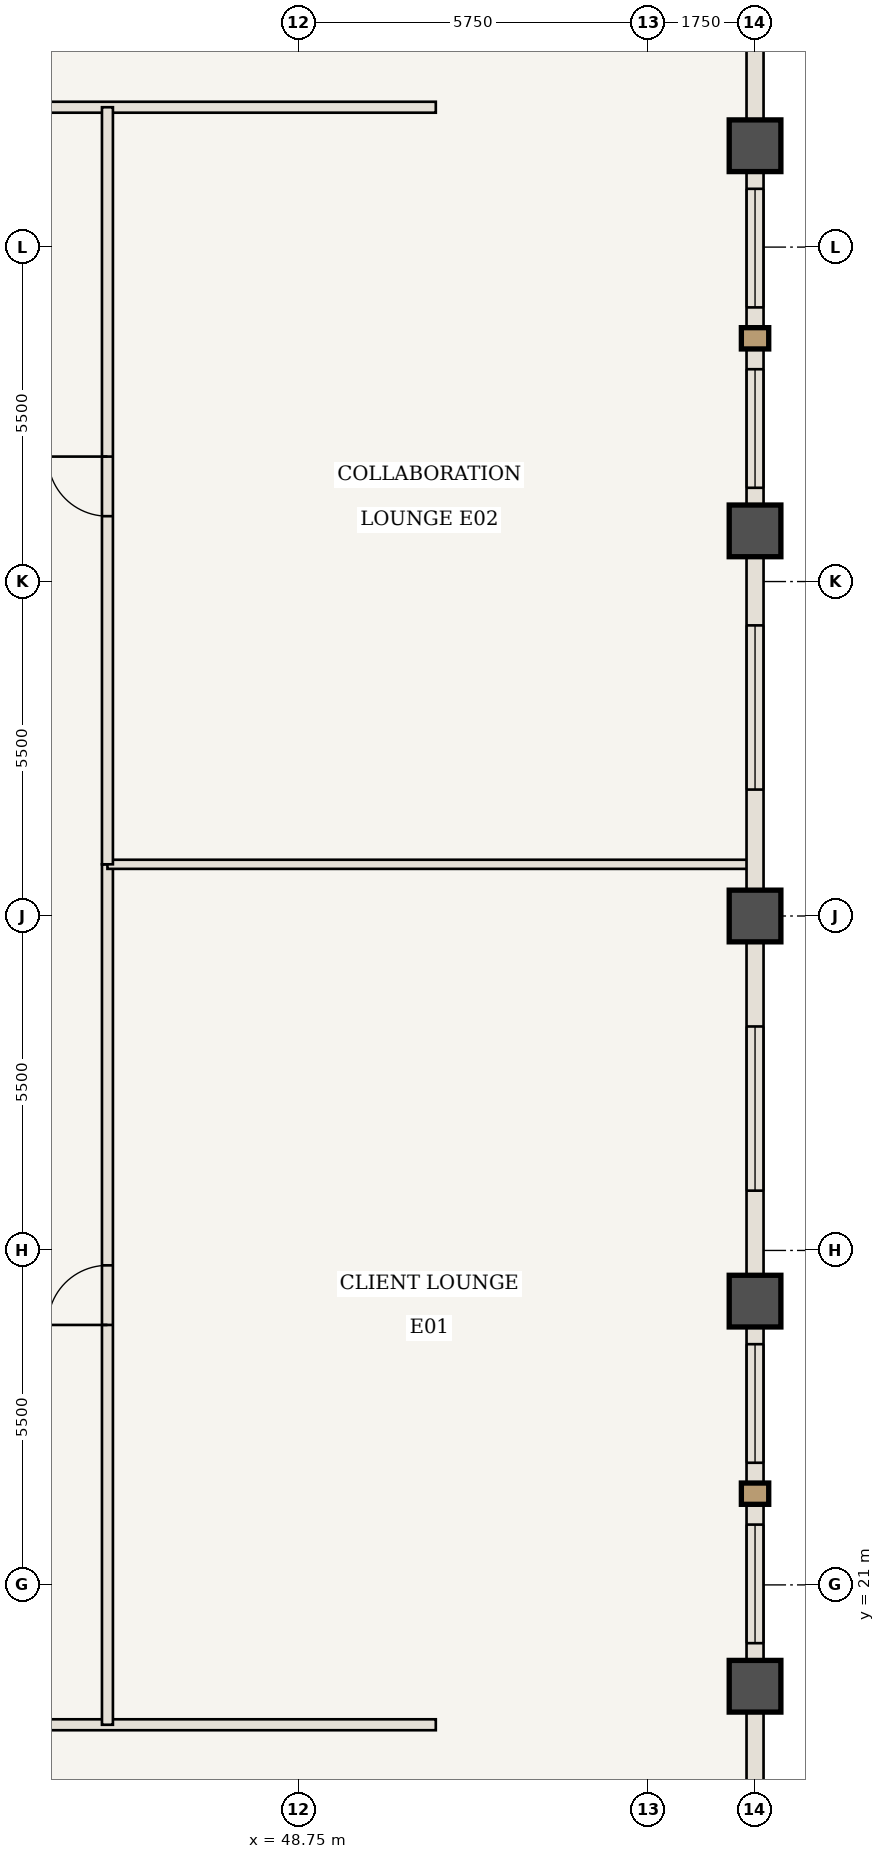
"""IFC4 building model, lengths in metres.
Left out: names, types, materials, properties, quantities, classifications, styles, units other than length and angle.
Written with IfcOpenShell. Run it as: python <this file> out.ifc"""

import sys

from ifc_helpers import new_model, si_unit, direction, frame, frame_2d, origin, origin_2d, place, context, subcontext, project, spatial, rectangle, extrude, element, fill, save


model = new_model("IFC4")
c1 = context("Model", 3, precision=1e-05, world=origin(), true_north=direction((0.0, 1.0)))
c2 = subcontext(c1, "Body", "Model", "MODEL_VIEW")
j1 = project(units=[si_unit("LENGTHUNIT", "METRE"), si_unit("PLANEANGLEUNIT", "RADIAN")], contexts=[c1])
p1 = place(None, origin())
s1 = spatial("IfcSite", under=j1, at=p1, CompositionType="ELEMENT")
p2 = place(p1, origin())
s2 = spatial("IfcBuilding", under=s1, at=p2, CompositionType="ELEMENT")
p3 = place(p2, frame((0.0, 0.0, 217.7)))
s3 = spatial("IfcBuildingStorey", under=s2, at=p3, CompositionType="ELEMENT", Elevation=217.7)
for number, where, z_axis, x_axis in (
    (1, (56.25, 19.333, 0.0), (0.0, 0.0, 1.0), (1.0, 0.0, 0.0)),
    (2, (56.25, 25.667, 0.0), (0.0, 0.0, 1.0), (1.0, 0.0, 0.0)),
    (3, (56.25, 32.0, 0.0), (0.0, 0.0, 1.0), (1.0, 0.0, 0.0)),
    (4, (56.25, 38.333, 0.0), (0.0, 0.0, 1.0), (1.0, 0.0, 0.0)),
    (5, (56.25, 44.667, 0.0), (0.0, 0.0, 1.0), (1.0, 0.0, 0.0)),
):
    element("IfcColumn", number, at=place(p3, frame(where, z_axis=z_axis, x_axis=x_axis)), inside=s3, PredefinedType="COLUMN", context=c2, shape_type="SweptSolid", body=[
        extrude(rectangle(XDim=0.85, YDim=0.85, at=origin_2d()), origin(), (0.0, 0.0, 1.0), 3.85),
    ])
p4 = place(p3, frame((32.925, 18.7, 0.0), z_axis=(0.0, 0.0, 1.0), x_axis=(1.0, 0.0, 0.0)))
e6 = element("IfcWall", 6, at=p4, inside=s3, PredefinedType="STANDARD", context=c2, shape_type="SweptSolid", body=[
    extrude(rectangle(XDim=18.075, YDim=0.18, at=frame_2d((9.038, 0.0))), origin(), (0.0, 0.0, 1.0), 3.685),
])
p5 = place(p4, frame((5.812, 0.0, 0.0)))
e7 = element("IfcOpeningElement", 7, at=p5, cuts=e6, PredefinedType="OPENING", context=c2, shape_type="SweptSolid", body=[
    extrude(rectangle(XDim=0.98, YDim=2.2, at=frame_2d((0.49, 1.1))), frame((0.0, 0.1, 0.0), z_axis=(0.0, -1.0, 0.0), x_axis=(1.0, 0.0, 0.0)), (0.0, 0.0, 1.0), 0.2),
])
p6 = place(p3, frame((24.542, 45.3, 0.0), z_axis=(0.0, 0.0, 1.0), x_axis=(1.0, 0.0, 0.0)))
e8 = element("IfcWall", 8, at=p6, inside=s3, PredefinedType="STANDARD", context=c2, shape_type="SweptSolid", body=[
    extrude(rectangle(XDim=26.458, YDim=0.18, at=frame_2d((13.229, 0.0))), origin(), (0.0, 0.0, 1.0), 3.685),
])
p7 = place(p6, frame((10.004, 0.0, 0.0)))
e9 = element("IfcOpeningElement", 9, at=p7, cuts=e8, PredefinedType="OPENING", context=c2, shape_type="SweptSolid", body=[
    extrude(rectangle(XDim=0.98, YDim=2.2, at=frame_2d((0.49, 1.1))), frame((0.0, 0.1, 0.0), z_axis=(0.0, -1.0, 0.0), x_axis=(1.0, 0.0, 0.0)), (0.0, 0.0, 1.0), 0.2),
])
p8 = place(p3, frame((45.6, 18.7, 0.0), z_axis=(0.0, 0.0, 1.0), x_axis=(0.0, 1.0, 0.0)))
e10 = element("IfcWall", 10, at=p8, inside=s3, PredefinedType="STANDARD", context=c2, shape_type="SweptSolid", body=[
    extrude(rectangle(XDim=14.15, YDim=0.18, at=frame_2d((7.075, 0.0))), origin(), (0.0, 0.0, 1.0), 3.685),
])
p9 = place(p8, frame((6.575, 0.0, 0.0)))
e11 = element("IfcOpeningElement", 11, at=p9, cuts=e10, PredefinedType="OPENING", context=c2, shape_type="SweptSolid", body=[
    extrude(rectangle(XDim=0.98, YDim=2.2, at=frame_2d((0.49, 1.1))), frame((0.0, 0.1, 0.0), z_axis=(0.0, -1.0, 0.0), x_axis=(1.0, 0.0, 0.0)), (0.0, 0.0, 1.0), 0.2),
])
p10 = place(p3, frame((45.6, 32.85, 0.0), z_axis=(0.0, 0.0, 1.0), x_axis=(1.0, 0.0, 0.0)))
e12 = element("IfcWall", 12, at=p10, inside=s3, PredefinedType="STANDARD", context=c2, shape_type="SweptSolid", body=[
    extrude(rectangle(XDim=10.59, YDim=0.15, at=frame_2d((5.295, 0.0))), origin(), (0.0, 0.0, 1.0), 3.685),
])
p11 = place(p3, frame((45.6, 32.85, 0.0), z_axis=(0.0, 0.0, 1.0), x_axis=(0.0, 1.0, 0.0)))
e13 = element("IfcWall", 13, at=p11, inside=s3, PredefinedType="STANDARD", context=c2, shape_type="SweptSolid", body=[
    extrude(rectangle(XDim=12.45, YDim=0.18, at=frame_2d((6.225, 0.0))), origin(), (0.0, 0.0, 1.0), 3.685),
])
p12 = place(p11, frame((5.725, 0.0, 0.0)))
e14 = element("IfcOpeningElement", 14, at=p12, cuts=e13, PredefinedType="OPENING", context=c2, shape_type="SweptSolid", body=[
    extrude(rectangle(XDim=0.98, YDim=2.2, at=frame_2d((0.49, 1.1))), frame((0.0, 0.1, 0.0), z_axis=(0.0, -1.0, 0.0), x_axis=(1.0, 0.0, 0.0)), (0.0, 0.0, 1.0), 0.2),
])
p13 = place(p3, frame((56.25, 19.333, 0.0), z_axis=(0.0, 0.0, 1.0), x_axis=(0.0, -1.0, 0.0)))
e15 = element("IfcWall", 15, at=p13, inside=s3, PredefinedType="USERDEFINED", context=c2, shape_type="SweptSolid", body=[
    extrude(rectangle(XDim=6.333, YDim=0.28, at=frame_2d((3.167, 0.0))), origin(), (0.0, 0.0, 1.0), 2.985),
])
p14 = place(p3, frame((56.25, 25.667, 0.0), z_axis=(0.0, 0.0, 1.0), x_axis=(0.0, -1.0, 0.0)))
e16 = element("IfcWall", 16, at=p14, inside=s3, PredefinedType="USERDEFINED", context=c2, shape_type="SweptSolid", body=[
    extrude(rectangle(XDim=6.333, YDim=0.28, at=frame_2d((3.167, 0.0))), origin(), (0.0, 0.0, 1.0), 2.985),
])
p15 = place(p14, frame((0.708, 0.0, 0.85)))
e17 = element("IfcOpeningElement", 17, at=p15, cuts=e16, PredefinedType="OPENING", context=c2, shape_type="SweptSolid", body=[
    extrude(rectangle(XDim=1.95, YDim=1.935, at=frame_2d((0.975, 0.968))), frame((0.0, 0.15, 0.0), z_axis=(0.0, -1.0, 0.0), x_axis=(1.0, 0.0, 0.0)), (0.0, 0.0, 1.0), 0.3),
])
p16 = place(p14, frame((3.675, 0.0, 0.85)))
e18 = element("IfcOpeningElement", 18, at=p16, cuts=e16, PredefinedType="OPENING", context=c2, shape_type="SweptSolid", body=[
    extrude(rectangle(XDim=1.95, YDim=1.935, at=frame_2d((0.975, 0.968))), frame((0.0, 0.15, 0.0), z_axis=(0.0, -1.0, 0.0), x_axis=(1.0, 0.0, 0.0)), (0.0, 0.0, 1.0), 0.3),
])
p17 = place(p3, frame((56.25, 32.0, 0.0), z_axis=(0.0, 0.0, 1.0), x_axis=(0.0, -1.0, 0.0)))
e19 = element("IfcWall", 19, at=p17, inside=s3, PredefinedType="USERDEFINED", context=c2, shape_type="SweptSolid", body=[
    extrude(rectangle(XDim=6.333, YDim=0.28, at=frame_2d((3.167, 0.0))), origin(), (0.0, 0.0, 1.0), 2.985),
])
p18 = place(p17, frame((1.817, 0.0, 0.85)))
e20 = element("IfcOpeningElement", 20, at=p18, cuts=e19, PredefinedType="OPENING", context=c2, shape_type="SweptSolid", body=[
    extrude(rectangle(XDim=2.7, YDim=1.935, at=frame_2d((1.35, 0.968))), frame((0.0, 0.15, 0.0), z_axis=(0.0, -1.0, 0.0), x_axis=(1.0, 0.0, 0.0)), (0.0, 0.0, 1.0), 0.3),
])
p19 = place(p3, frame((56.25, 38.333, 0.0), z_axis=(0.0, 0.0, 1.0), x_axis=(0.0, -1.0, 0.0)))
e21 = element("IfcWall", 21, at=p19, inside=s3, PredefinedType="USERDEFINED", context=c2, shape_type="SweptSolid", body=[
    extrude(rectangle(XDim=6.333, YDim=0.28, at=frame_2d((3.167, 0.0))), origin(), (0.0, 0.0, 1.0), 2.985),
])
p20 = place(p19, frame((1.554, 0.0, 0.85)))
e22 = element("IfcOpeningElement", 22, at=p20, cuts=e21, PredefinedType="OPENING", context=c2, shape_type="SweptSolid", body=[
    extrude(rectangle(XDim=2.7, YDim=1.935, at=frame_2d((1.35, 0.968))), frame((0.0, 0.15, 0.0), z_axis=(0.0, -1.0, 0.0), x_axis=(1.0, 0.0, 0.0)), (0.0, 0.0, 1.0), 0.3),
])
p21 = place(p3, frame((56.25, 44.667, 0.0), z_axis=(0.0, 0.0, 1.0), x_axis=(0.0, -1.0, 0.0)))
e23 = element("IfcWall", 23, at=p21, inside=s3, PredefinedType="USERDEFINED", context=c2, shape_type="SweptSolid", body=[
    extrude(rectangle(XDim=6.333, YDim=0.28, at=frame_2d((3.167, 0.0))), origin(), (0.0, 0.0, 1.0), 2.985),
])
p22 = place(p21, frame((0.708, 0.0, 0.85)))
e24 = element("IfcOpeningElement", 24, at=p22, cuts=e23, PredefinedType="OPENING", context=c2, shape_type="SweptSolid", body=[
    extrude(rectangle(XDim=1.95, YDim=1.935, at=frame_2d((0.975, 0.968))), frame((0.0, 0.15, 0.0), z_axis=(0.0, -1.0, 0.0), x_axis=(1.0, 0.0, 0.0)), (0.0, 0.0, 1.0), 0.3),
])
p23 = place(p21, frame((3.675, 0.0, 0.85)))
e25 = element("IfcOpeningElement", 25, at=p23, cuts=e23, PredefinedType="OPENING", context=c2, shape_type="SweptSolid", body=[
    extrude(rectangle(XDim=1.95, YDim=1.935, at=frame_2d((0.975, 0.968))), frame((0.0, 0.15, 0.0), z_axis=(0.0, -1.0, 0.0), x_axis=(1.0, 0.0, 0.0)), (0.0, 0.0, 1.0), 0.3),
])
p24 = place(p3, frame((56.25, 51.0, 0.0), z_axis=(0.0, 0.0, 1.0), x_axis=(0.0, -1.0, 0.0)))
e26 = element("IfcWall", 26, at=p24, inside=s3, PredefinedType="USERDEFINED", context=c2, shape_type="SweptSolid", body=[
    extrude(rectangle(XDim=6.333, YDim=0.28, at=frame_2d((3.167, 0.0))), origin(), (0.0, 0.0, 1.0), 2.985),
])
p25 = place(p9, origin())
e27 = element("IfcDoor", 27, at=p25, inside=s3, OperationType="SINGLE_SWING_LEFT", PredefinedType="DOOR", context=c2, shape_type="SweptSolid", body=[
    extrude(rectangle(XDim=0.98, YDim=2.2, at=frame_2d((0.49, 1.1))), frame((0.0, 0.025, 0.0), z_axis=(0.0, -1.0, 0.0), x_axis=(1.0, 0.0, 0.0)), (0.0, 0.0, 1.0), 0.05),
])
fill(e11, e27)
p26 = place(p12, origin())
e28 = element("IfcDoor", 28, at=p26, inside=s3, OperationType="SINGLE_SWING_RIGHT", PredefinedType="DOOR", context=c2, shape_type="SweptSolid", body=[
    extrude(rectangle(XDim=0.98, YDim=2.2, at=frame_2d((0.49, 1.1))), frame((0.0, 0.025, 0.0), z_axis=(0.0, -1.0, 0.0), x_axis=(1.0, 0.0, 0.0)), (0.0, 0.0, 1.0), 0.05),
])
fill(e14, e28)
p27 = place(p15, origin())
e29 = element("IfcWindow", 29, at=p27, inside=s3, PartitioningType="SINGLE_PANEL", PredefinedType="WINDOW", context=c2, shape_type="SweptSolid", body=[
    extrude(rectangle(XDim=1.95, YDim=1.935, at=frame_2d((0.975, 0.968))), frame((0.0, 0.03, 0.0), z_axis=(0.0, -1.0, 0.0), x_axis=(1.0, 0.0, 0.0)), (0.0, 0.0, 1.0), 0.06),
])
fill(e17, e29)
p28 = place(p16, origin())
e30 = element("IfcWindow", 30, at=p28, inside=s3, PartitioningType="SINGLE_PANEL", PredefinedType="WINDOW", context=c2, shape_type="SweptSolid", body=[
    extrude(rectangle(XDim=1.95, YDim=1.935, at=frame_2d((0.975, 0.968))), frame((0.0, 0.03, 0.0), z_axis=(0.0, -1.0, 0.0), x_axis=(1.0, 0.0, 0.0)), (0.0, 0.0, 1.0), 0.06),
])
fill(e18, e30)
p29 = place(p18, origin())
e31 = element("IfcWindow", 31, at=p29, inside=s3, PartitioningType="SINGLE_PANEL", PredefinedType="WINDOW", context=c2, shape_type="SweptSolid", body=[
    extrude(rectangle(XDim=2.7, YDim=1.935, at=frame_2d((1.35, 0.968))), frame((0.0, 0.03, 0.0), z_axis=(0.0, -1.0, 0.0), x_axis=(1.0, 0.0, 0.0)), (0.0, 0.0, 1.0), 0.06),
])
fill(e20, e31)
p30 = place(p20, origin())
e32 = element("IfcWindow", 32, at=p30, inside=s3, PartitioningType="SINGLE_PANEL", PredefinedType="WINDOW", context=c2, shape_type="SweptSolid", body=[
    extrude(rectangle(XDim=2.7, YDim=1.935, at=frame_2d((1.35, 0.968))), frame((0.0, 0.03, 0.0), z_axis=(0.0, -1.0, 0.0), x_axis=(1.0, 0.0, 0.0)), (0.0, 0.0, 1.0), 0.06),
])
fill(e22, e32)
p31 = place(p22, origin())
e33 = element("IfcWindow", 33, at=p31, inside=s3, PartitioningType="SINGLE_PANEL", PredefinedType="WINDOW", context=c2, shape_type="SweptSolid", body=[
    extrude(rectangle(XDim=1.95, YDim=1.935, at=frame_2d((0.975, 0.968))), frame((0.0, 0.03, 0.0), z_axis=(0.0, -1.0, 0.0), x_axis=(1.0, 0.0, 0.0)), (0.0, 0.0, 1.0), 0.06),
])
fill(e24, e33)
p32 = place(p23, origin())
e34 = element("IfcWindow", 34, at=p32, inside=s3, PartitioningType="SINGLE_PANEL", PredefinedType="WINDOW", context=c2, shape_type="SweptSolid", body=[
    extrude(rectangle(XDim=1.95, YDim=1.935, at=frame_2d((0.975, 0.968))), frame((0.0, 0.03, 0.0), z_axis=(0.0, -1.0, 0.0), x_axis=(1.0, 0.0, 0.0)), (0.0, 0.0, 1.0), 0.06),
])
fill(e25, e34)
save(model, sys.argv[1])
